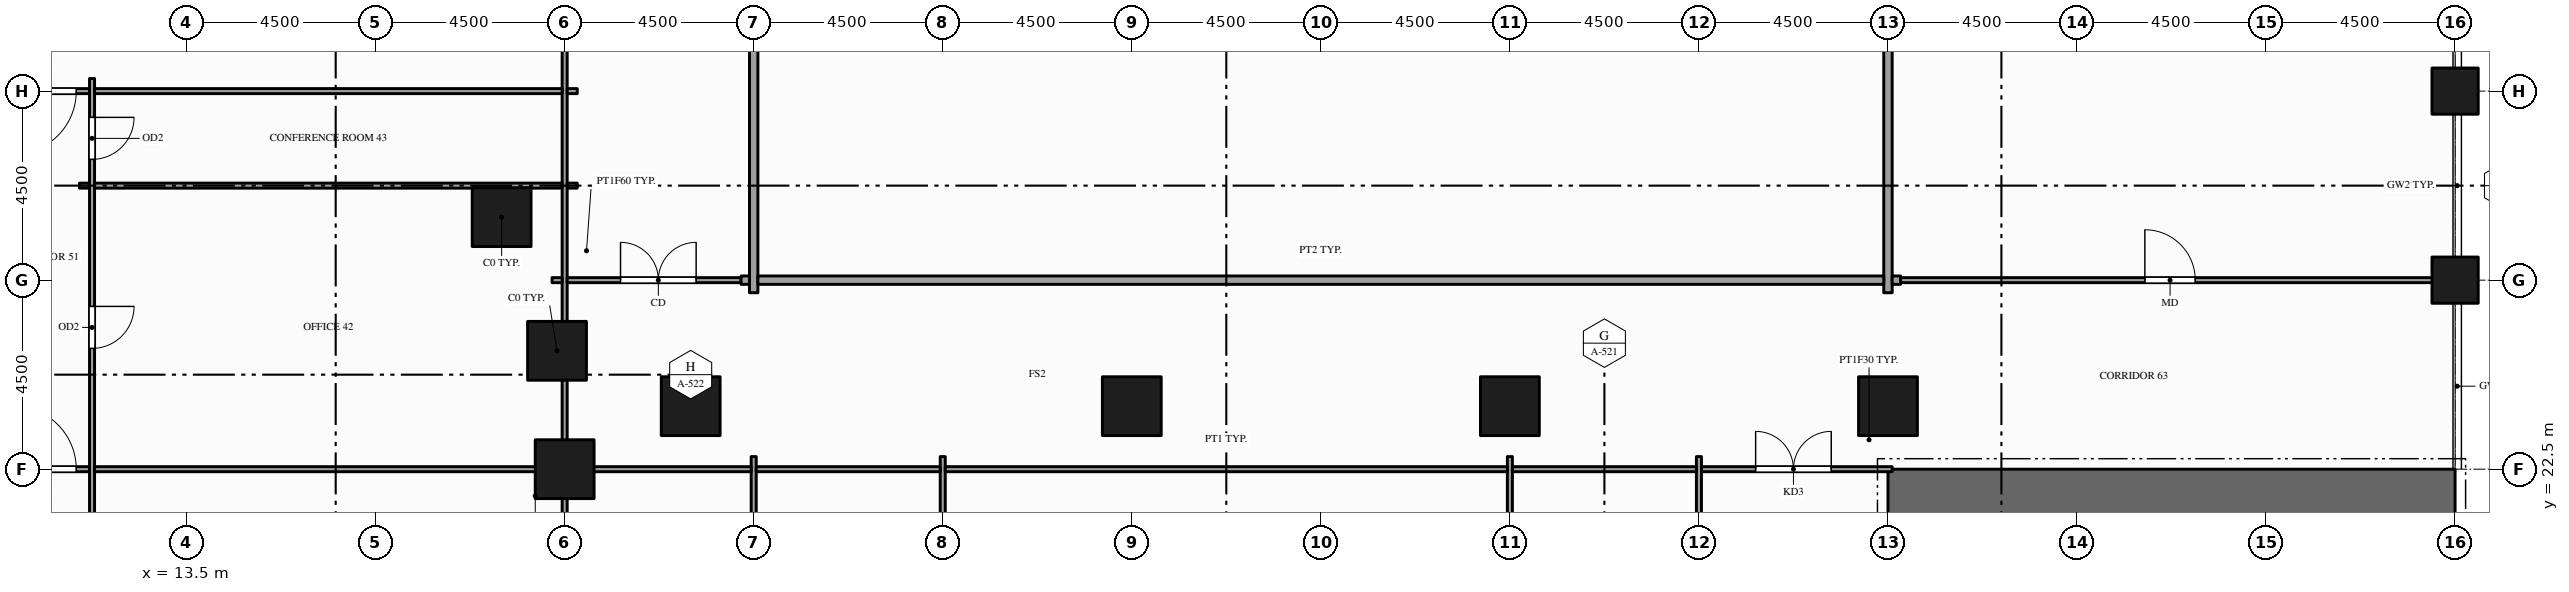
"""IFC4 building model, lengths in metres.
Left out: names, types, materials, properties, quantities, classifications, styles, units other than length and angle.
Written with IfcOpenShell. Run it as: python <this file> out.ifc"""

import sys

from ifc_helpers import new_model, si_unit, direction, frame, frame_2d, origin, origin_2d, place, context, subcontext, project, spatial, rectangle, hollow_rectangle, extrude, element, fill, save


model = new_model("IFC4")
c1 = context("Model", 3, precision=1e-05, world=origin(), true_north=direction((0.0, 1.0)))
c2 = subcontext(c1, "Body", "Model", "MODEL_VIEW")
j1 = project(units=[si_unit("LENGTHUNIT", "METRE"), si_unit("PLANEANGLEUNIT", "RADIAN")], contexts=[c1])
p1 = place(None, origin())
s1 = spatial("IfcSite", under=j1, at=p1, CompositionType="ELEMENT")
p2 = place(p1, origin())
s2 = spatial("IfcBuilding", under=s1, at=p2, CompositionType="ELEMENT")
p3 = place(p2, frame((0.0, 0.0, 14.0)))
s3 = spatial("IfcBuildingStorey", under=s2, at=p3, CompositionType="ELEMENT", Elevation=14.0)
p4 = place(p3, frame((54.0, 21.9, -0.15), z_axis=(0.0, 0.0, 1.0), x_axis=(1.0, 0.0, 0.0)))
e1 = element("IfcWall", 1, at=p4, inside=s3, PredefinedType="SHEAR", context=c2, shape_type="SweptSolid", body=[
    extrude(rectangle(XDim=13.5, YDim=1.2, at=frame_2d((6.75, 0.0))), origin(), (0.0, 0.0, 1.0), 5.0),
])
for number, where, z_axis, x_axis in (
    (2, (21.0, 28.5, -0.25), (0.0, 0.0, 1.0), (1.0, 0.0, 0.0)),
    (3, (22.318, 25.318, -0.25), (0.0, 0.0, 1.0), (1.0, 0.0, 0.0)),
    (4, (22.5, 22.5, -0.25), (0.0, 0.0, 1.0), (1.0, 0.0, 0.0)),
    (5, (25.5, 24.0, -0.25), (0.0, 0.0, 1.0), (1.0, 0.0, 0.0)),
    (6, (36.0, 24.0, -0.25), (0.0, 0.0, 1.0), (1.0, 0.0, 0.0)),
    (7, (45.0, 24.0, -0.25), (0.0, 0.0, 1.0), (1.0, 0.0, 0.0)),
    (8, (54.0, 24.0, -0.25), (0.0, 0.0, 1.0), (1.0, 0.0, 0.0)),
):
    element("IfcColumn", number, at=place(p3, frame(where, z_axis=z_axis, x_axis=x_axis)), inside=s3, PredefinedType="COLUMN", context=c2, shape_type="SweptSolid", body=[
        extrude(hollow_rectangle(XDim=1.4, YDim=1.4, WallThickness=0.08, at=origin_2d()), origin(), (0.0, 0.0, 1.0), 5.0),
    ])
for number, where, z_axis, x_axis in (
    (9, (67.5, 27.0, -0.25), (0.0, 0.0, 1.0), (1.0, 0.0, 0.0)),
    (10, (67.5, 31.5, -0.25), (0.0, 0.0, 1.0), (1.0, 0.0, 0.0)),
):
    element("IfcColumn", number, at=place(p3, frame(where, z_axis=z_axis, x_axis=x_axis)), inside=s3, PredefinedType="COLUMN", context=c2, shape_type="SweptSolid", body=[
        extrude(hollow_rectangle(XDim=1.1, YDim=1.1, WallThickness=0.06, at=origin_2d()), origin(), (0.0, 0.0, 1.0), 5.0),
    ])
p5 = place(p3, frame((11.25, 10.95, 0.0), z_axis=(0.0, 0.0, 1.0), x_axis=(0.0, 1.0, 0.0)))
e11 = element("IfcWall", 11, at=p5, inside=s3, PredefinedType="PARTITIONING", context=c2, shape_type="SweptSolid", body=[
    extrude(rectangle(XDim=20.85, YDim=0.12, at=frame_2d((10.425, 0.0))), origin(), (0.0, 0.0, 1.0), 3.5),
])
p6 = place(p5, frame((5.425, 0.0, 0.0)))
e12 = element("IfcOpeningElement", 12, at=p6, cuts=e11, PredefinedType="OPENING", context=c2, shape_type="SweptSolid", body=[
    extrude(rectangle(XDim=1.0, YDim=2.1, at=frame_2d((0.5, 1.05))), frame((0.0, 0.07, 0.0), z_axis=(0.0, -1.0, 0.0), x_axis=(1.0, 0.0, 0.0)), (0.0, 0.0, 1.0), 0.14),
])
p7 = place(p5, frame((14.425, 0.0, 0.0)))
e13 = element("IfcOpeningElement", 13, at=p7, cuts=e11, PredefinedType="OPENING", context=c2, shape_type="SweptSolid", body=[
    extrude(rectangle(XDim=1.0, YDim=2.1, at=frame_2d((0.5, 1.05))), frame((0.0, 0.07, 0.0), z_axis=(0.0, -1.0, 0.0), x_axis=(1.0, 0.0, 0.0)), (0.0, 0.0, 1.0), 0.14),
])
p8 = place(p5, frame((18.925, 0.0, 0.0)))
e14 = element("IfcOpeningElement", 14, at=p8, cuts=e11, PredefinedType="OPENING", context=c2, shape_type="SweptSolid", body=[
    extrude(rectangle(XDim=1.0, YDim=2.1, at=frame_2d((0.5, 1.05))), frame((0.0, 0.07, 0.0), z_axis=(0.0, -1.0, 0.0), x_axis=(1.0, 0.0, 0.0)), (0.0, 0.0, 1.0), 0.14),
])
p9 = place(p3, frame((22.5, 0.15, 0.0), z_axis=(0.0, 0.0, 1.0), x_axis=(0.0, 1.0, 0.0)))
e15 = element("IfcWall", 15, at=p9, inside=s3, PredefinedType="PARTITIONING", context=c2, shape_type="SweptSolid", body=[
    extrude(rectangle(XDim=35.95, YDim=0.12, at=frame_2d((17.975, 0.0))), origin(), (0.0, 0.0, 1.0), 3.759),
])
p10 = place(p9, frame((9.225, 0.0, 0.0)))
e16 = element("IfcOpeningElement", 16, at=p10, cuts=e15, PredefinedType="OPENING", context=c2, shape_type="SweptSolid", body=[
    extrude(rectangle(XDim=1.5, YDim=2.1, at=frame_2d((0.75, 1.05))), frame((0.0, 0.07, 0.0), z_axis=(0.0, -1.0, 0.0), x_axis=(1.0, 0.0, 0.0)), (0.0, 0.0, 1.0), 0.14),
])
p11 = place(p9, frame((32.7, 0.0, 0.0)))
e17 = element("IfcOpeningElement", 17, at=p11, cuts=e15, PredefinedType="OPENING", context=c2, shape_type="SweptSolid", body=[
    extrude(rectangle(XDim=1.8, YDim=2.1, at=frame_2d((0.9, 1.05))), frame((0.0, 0.07, 0.0), z_axis=(0.0, -1.0, 0.0), x_axis=(1.0, 0.0, 0.0)), (0.0, 0.0, 1.0), 0.14),
])
p12 = place(p3, frame((27.0, 10.95, 0.0), z_axis=(0.0, 0.0, 1.0), x_axis=(0.0, 1.0, 0.0)))
e18 = element("IfcWall", 18, at=p12, inside=s3, PredefinedType="PARTITIONING", context=c2, shape_type="SweptSolid", body=[
    extrude(rectangle(XDim=11.85, YDim=0.12, at=frame_2d((5.925, 0.0))), origin(), (0.0, 0.0, 1.0), 3.759),
])
p13 = place(p3, frame((27.0, 26.7, 0.0), z_axis=(0.0, 0.0, 1.0), x_axis=(0.0, 1.0, 0.0)))
e19 = element("IfcWall", 19, at=p13, inside=s3, PredefinedType="PARTITIONING", context=c2, shape_type="SweptSolid", body=[
    extrude(rectangle(XDim=22.65, YDim=0.2, at=frame_2d((11.325, 0.0))), origin(), (0.0, 0.0, 1.0), 3.66),
])
p14 = place(p13, frame((19.115, 0.0, 0.0)))
e20 = element("IfcOpeningElement", 20, at=p14, cuts=e19, PredefinedType="OPENING", context=c2, shape_type="SweptSolid", body=[
    extrude(rectangle(XDim=1.2, YDim=2.1, at=frame_2d((0.6, 1.05))), frame((0.0, 0.11, 0.0), z_axis=(0.0, -1.0, 0.0), x_axis=(1.0, 0.0, 0.0)), (0.0, 0.0, 1.0), 0.22),
])
p15 = place(p3, frame((31.5, 10.95, 0.0), z_axis=(0.0, 0.0, 1.0), x_axis=(0.0, 1.0, 0.0)))
e21 = element("IfcWall", 21, at=p15, inside=s3, PredefinedType="PARTITIONING", context=c2, shape_type="SweptSolid", body=[
    extrude(rectangle(XDim=11.85, YDim=0.12, at=frame_2d((5.925, 0.0))), origin(), (0.0, 0.0, 1.0), 3.759),
])
p16 = place(p3, frame((45.0, 0.15, 0.0), z_axis=(0.0, 0.0, 1.0), x_axis=(0.0, 1.0, 0.0)))
e22 = element("IfcWall", 22, at=p16, inside=s3, PredefinedType="PARTITIONING", context=c2, shape_type="SweptSolid", body=[
    extrude(rectangle(XDim=22.65, YDim=0.12, at=frame_2d((11.325, 0.0))), origin(), (0.0, 0.0, 1.0), 3.759),
])
p17 = place(p16, frame((9.225, 0.0, 0.0)))
e23 = element("IfcOpeningElement", 23, at=p17, cuts=e22, PredefinedType="OPENING", context=c2, shape_type="SweptSolid", body=[
    extrude(rectangle(XDim=1.5, YDim=2.1, at=frame_2d((0.75, 1.05))), frame((0.0, 0.07, 0.0), z_axis=(0.0, -1.0, 0.0), x_axis=(1.0, 0.0, 0.0)), (0.0, 0.0, 1.0), 0.14),
])
p18 = place(p3, frame((49.5, 0.15, 0.0), z_axis=(0.0, 0.0, 1.0), x_axis=(0.0, 1.0, 0.0)))
e24 = element("IfcWall", 24, at=p18, inside=s3, PredefinedType="PARTITIONING", context=c2, shape_type="SweptSolid", body=[
    extrude(rectangle(XDim=22.65, YDim=0.12, at=frame_2d((11.325, 0.0))), origin(), (0.0, 0.0, 1.0), 3.759),
])
p19 = place(p18, frame((0.955, 0.0, 0.0)))
e25 = element("IfcOpeningElement", 25, at=p19, cuts=e24, PredefinedType="OPENING", context=c2, shape_type="SweptSolid", body=[
    extrude(rectangle(XDim=0.9, YDim=2.1, at=frame_2d((0.45, 1.05))), frame((0.0, 0.07, 0.0), z_axis=(0.0, -1.0, 0.0), x_axis=(1.0, 0.0, 0.0)), (0.0, 0.0, 1.0), 0.14),
])
p20 = place(p18, frame((3.9, 0.0, 0.0)))
e26 = element("IfcOpeningElement", 26, at=p20, cuts=e24, PredefinedType="OPENING", context=c2, shape_type="SweptSolid", body=[
    extrude(rectangle(XDim=0.9, YDim=2.1, at=frame_2d((0.45, 1.05))), frame((0.0, 0.07, 0.0), z_axis=(0.0, -1.0, 0.0), x_axis=(1.0, 0.0, 0.0)), (0.0, 0.0, 1.0), 0.14),
])
p21 = place(p18, frame((6.85, 0.0, 0.0)))
e27 = element("IfcOpeningElement", 27, at=p21, cuts=e24, PredefinedType="OPENING", context=c2, shape_type="SweptSolid", body=[
    extrude(rectangle(XDim=1.0, YDim=2.1, at=frame_2d((0.5, 1.05))), frame((0.0, 0.07, 0.0), z_axis=(0.0, -1.0, 0.0), x_axis=(1.0, 0.0, 0.0)), (0.0, 0.0, 1.0), 0.14),
])
p22 = place(p18, frame((16.275, 0.0, 0.0)))
e28 = element("IfcOpeningElement", 28, at=p22, cuts=e24, PredefinedType="OPENING", context=c2, shape_type="SweptSolid", body=[
    extrude(rectangle(XDim=0.9, YDim=2.1, at=frame_2d((0.45, 1.05))), frame((0.0, 0.07, 0.0), z_axis=(0.0, -1.0, 0.0), x_axis=(1.0, 0.0, 0.0)), (0.0, 0.0, 1.0), 0.14),
])
p23 = place(p18, frame((9.225, 0.0, 0.0)))
e29 = element("IfcOpeningElement", 29, at=p23, cuts=e24, PredefinedType="OPENING", context=c2, shape_type="SweptSolid", body=[
    extrude(rectangle(XDim=1.5, YDim=2.1, at=frame_2d((0.75, 1.05))), frame((0.0, 0.07, 0.0), z_axis=(0.0, -1.0, 0.0), x_axis=(1.0, 0.0, 0.0)), (0.0, 0.0, 1.0), 0.14),
])
p24 = place(p3, frame((54.0, 26.7, 0.0), z_axis=(0.0, 0.0, 1.0), x_axis=(0.0, 1.0, 0.0)))
e30 = element("IfcWall", 30, at=p24, inside=s3, PredefinedType="PARTITIONING", context=c2, shape_type="SweptSolid", body=[
    extrude(rectangle(XDim=22.65, YDim=0.2, at=frame_2d((11.325, 0.0))), origin(), (0.0, 0.0, 1.0), 3.66),
])
p25 = place(p3, frame((9.06, 22.5, 0.0), z_axis=(0.0, 0.0, 1.0), x_axis=(1.0, 0.0, 0.0)))
e31 = element("IfcWall", 31, at=p25, inside=s3, PredefinedType="PARTITIONING", context=c2, shape_type="SweptSolid", body=[
    extrude(rectangle(XDim=2.13, YDim=0.12, at=frame_2d((1.065, 0.0))), origin(), (0.0, 0.0, 1.0), 3.5),
])
p26 = place(p25, frame((0.315, 0.0, 0.0)))
e32 = element("IfcOpeningElement", 32, at=p26, cuts=e31, PredefinedType="OPENING", context=c2, shape_type="SweptSolid", body=[
    extrude(rectangle(XDim=1.5, YDim=2.1, at=frame_2d((0.75, 1.05))), frame((0.0, 0.07, 0.0), z_axis=(0.0, -1.0, 0.0), x_axis=(1.0, 0.0, 0.0)), (0.0, 0.0, 1.0), 0.14),
])
p27 = place(p3, frame((11.31, 22.5, 0.0), z_axis=(0.0, 0.0, 1.0), x_axis=(1.0, 0.0, 0.0)))
e33 = element("IfcWall", 33, at=p27, inside=s3, PredefinedType="PARTITIONING", context=c2, shape_type="SweptSolid", body=[
    extrude(rectangle(XDim=11.13, YDim=0.12, at=frame_2d((5.565, 0.0))), origin(), (0.0, 0.0, 1.0), 3.5),
])
for number, where, z_axis, x_axis in (
    (34, (22.56, 22.5, 0.0), (0.0, 0.0, 1.0), (1.0, 0.0, 0.0)),
    (35, (27.06, 22.5, 0.0), (0.0, 0.0, 1.0), (1.0, 0.0, 0.0)),
):
    element("IfcWall", number, at=place(p3, frame(where, z_axis=z_axis, x_axis=x_axis)), inside=s3, PredefinedType="PARTITIONING", context=c2, shape_type="SweptSolid", body=[
        extrude(rectangle(XDim=4.38, YDim=0.12, at=frame_2d((2.19, 0.0))), origin(), (0.0, 0.0, 1.0), 3.66),
    ])
p28 = place(p3, frame((31.56, 22.5, 0.0), z_axis=(0.0, 0.0, 1.0), x_axis=(1.0, 0.0, 0.0)))
e36 = element("IfcWall", 36, at=p28, inside=s3, PredefinedType="PARTITIONING", context=c2, shape_type="SweptSolid", body=[
    extrude(rectangle(XDim=13.38, YDim=0.12, at=frame_2d((6.69, 0.0))), origin(), (0.0, 0.0, 1.0), 3.66),
])
p29 = place(p3, frame((45.06, 22.5, 0.0), z_axis=(0.0, 0.0, 1.0), x_axis=(1.0, 0.0, 0.0)))
e37 = element("IfcWall", 37, at=p29, inside=s3, PredefinedType="PARTITIONING", context=c2, shape_type="SweptSolid", body=[
    extrude(rectangle(XDim=4.38, YDim=0.12, at=frame_2d((2.19, 0.0))), origin(), (0.0, 0.0, 1.0), 3.66),
])
p30 = place(p3, frame((49.56, 22.5, 0.0), z_axis=(0.0, 0.0, 1.0), x_axis=(1.0, 0.0, 0.0)))
e38 = element("IfcWall", 38, at=p30, inside=s3, PredefinedType="PARTITIONING", context=c2, shape_type="SweptSolid", body=[
    extrude(rectangle(XDim=4.54, YDim=0.12, at=frame_2d((2.27, 0.0))), origin(), (0.0, 0.0, 1.0), 3.66),
])
p31 = place(p30, frame((1.29, 0.0, 0.0)))
e39 = element("IfcOpeningElement", 39, at=p31, cuts=e38, PredefinedType="OPENING", context=c2, shape_type="SweptSolid", body=[
    extrude(rectangle(XDim=1.8, YDim=2.1, at=frame_2d((0.9, 1.05))), frame((0.0, 0.07, 0.0), z_axis=(0.0, -1.0, 0.0), x_axis=(1.0, 0.0, 0.0)), (0.0, 0.0, 1.0), 0.14),
])
p32 = place(p3, frame((22.2, 27.0, 0.0), z_axis=(0.0, 0.0, 1.0), x_axis=(1.0, 0.0, 0.0)))
e40 = element("IfcWall", 40, at=p32, inside=s3, PredefinedType="PARTITIONING", context=c2, shape_type="SweptSolid", body=[
    extrude(rectangle(XDim=0.24, YDim=0.12, at=frame_2d((0.12, 0.0))), origin(), (0.0, 0.0, 1.0), 3.759),
])
p33 = place(p3, frame((22.56, 27.0, 0.0), z_axis=(0.0, 0.0, 1.0), x_axis=(1.0, 0.0, 0.0)))
e41 = element("IfcWall", 41, at=p33, inside=s3, PredefinedType="PARTITIONING", context=c2, shape_type="SweptSolid", body=[
    extrude(rectangle(XDim=4.14, YDim=0.12, at=frame_2d((2.07, 0.0))), origin(), (0.0, 0.0, 1.0), 3.66),
])
p34 = place(p33, frame((1.27, 0.0, 0.0)))
e42 = element("IfcOpeningElement", 42, at=p34, cuts=e41, PredefinedType="OPENING", context=c2, shape_type="SweptSolid", body=[
    extrude(rectangle(XDim=1.8, YDim=2.1, at=frame_2d((0.9, 1.05))), frame((0.0, 0.07, 0.0), z_axis=(0.0, -1.0, 0.0), x_axis=(1.0, 0.0, 0.0)), (0.0, 0.0, 1.0), 0.14),
])
p35 = place(p3, frame((26.7, 27.0, 0.0), z_axis=(0.0, 0.0, 1.0), x_axis=(1.0, 0.0, 0.0)))
e43 = element("IfcWall", 43, at=p35, inside=s3, PredefinedType="PARTITIONING", context=c2, shape_type="SweptSolid", body=[
    extrude(rectangle(XDim=0.2, YDim=0.2, at=frame_2d((0.1, 0.0))), origin(), (0.0, 0.0, 1.0), 3.66),
])
p36 = place(p3, frame((27.1, 27.0, 0.0), z_axis=(0.0, 0.0, 1.0), x_axis=(1.0, 0.0, 0.0)))
e44 = element("IfcWall", 44, at=p36, inside=s3, PredefinedType="PARTITIONING", context=c2, shape_type="SweptSolid", body=[
    extrude(rectangle(XDim=26.8, YDim=0.2, at=frame_2d((13.4, 0.0))), origin(), (0.0, 0.0, 1.0), 3.66),
])
p37 = place(p3, frame((54.1, 27.0, 0.0), z_axis=(0.0, 0.0, 1.0), x_axis=(1.0, 0.0, 0.0)))
e45 = element("IfcWall", 45, at=p37, inside=s3, PredefinedType="PARTITIONING", context=c2, shape_type="SweptSolid", body=[
    extrude(rectangle(XDim=0.2, YDim=0.2, at=frame_2d((0.1, 0.0))), origin(), (0.0, 0.0, 1.0), 3.66),
])
p38 = place(p3, frame((54.3, 27.0, 0.0), z_axis=(0.0, 0.0, 1.0), x_axis=(1.0, 0.0, 0.0)))
e46 = element("IfcWall", 46, at=p38, inside=s3, PredefinedType="PARTITIONING", context=c2, shape_type="SweptSolid", body=[
    extrude(rectangle(XDim=13.05, YDim=0.12, at=frame_2d((6.525, 0.0))), origin(), (0.0, 0.0, 1.0), 3.66),
])
p39 = place(p38, frame((5.815, 0.0, 0.0)))
e47 = element("IfcOpeningElement", 47, at=p39, cuts=e46, PredefinedType="OPENING", context=c2, shape_type="SweptSolid", body=[
    extrude(rectangle(XDim=1.2, YDim=2.1, at=frame_2d((0.6, 1.05))), frame((0.0, 0.07, 0.0), z_axis=(0.0, -1.0, 0.0), x_axis=(1.0, 0.0, 0.0)), (0.0, 0.0, 1.0), 0.14),
])
p40 = place(p3, frame((10.95, 29.25, 0.0), z_axis=(0.0, 0.0, 1.0), x_axis=(1.0, 0.0, 0.0)))
e48 = element("IfcWall", 48, at=p40, inside=s3, PredefinedType="PARTITIONING", context=c2, shape_type="SweptSolid", body=[
    extrude(rectangle(XDim=0.24, YDim=0.12, at=frame_2d((0.12, 0.0))), origin(), (0.0, 0.0, 1.0), 3.759),
])
p41 = place(p3, frame((11.31, 29.25, 0.0), z_axis=(0.0, 0.0, 1.0), x_axis=(1.0, 0.0, 0.0)))
e49 = element("IfcWall", 49, at=p41, inside=s3, PredefinedType="PARTITIONING", context=c2, shape_type="SweptSolid", body=[
    extrude(rectangle(XDim=11.13, YDim=0.12, at=frame_2d((5.565, 0.0))), origin(), (0.0, 0.0, 1.0), 3.5),
])
p42 = place(p3, frame((22.56, 29.25, 0.0), z_axis=(0.0, 0.0, 1.0), x_axis=(1.0, 0.0, 0.0)))
e50 = element("IfcWall", 50, at=p42, inside=s3, PredefinedType="PARTITIONING", context=c2, shape_type="SweptSolid", body=[
    extrude(rectangle(XDim=0.24, YDim=0.12, at=frame_2d((0.12, 0.0))), origin(), (0.0, 0.0, 1.0), 3.759),
])
p43 = place(p3, frame((9.06, 31.5, 0.0), z_axis=(0.0, 0.0, 1.0), x_axis=(1.0, 0.0, 0.0)))
e51 = element("IfcWall", 51, at=p43, inside=s3, PredefinedType="PARTITIONING", context=c2, shape_type="SweptSolid", body=[
    extrude(rectangle(XDim=2.13, YDim=0.12, at=frame_2d((1.065, 0.0))), origin(), (0.0, 0.0, 1.0), 3.759),
])
p44 = place(p43, frame((0.315, 0.0, 0.0)))
e52 = element("IfcOpeningElement", 52, at=p44, cuts=e51, PredefinedType="OPENING", context=c2, shape_type="SweptSolid", body=[
    extrude(rectangle(XDim=1.5, YDim=2.1, at=frame_2d((0.75, 1.05))), frame((0.0, 0.07, 0.0), z_axis=(0.0, -1.0, 0.0), x_axis=(1.0, 0.0, 0.0)), (0.0, 0.0, 1.0), 0.14),
])
p45 = place(p3, frame((11.31, 31.5, 0.0), z_axis=(0.0, 0.0, 1.0), x_axis=(1.0, 0.0, 0.0)))
e53 = element("IfcWall", 53, at=p45, inside=s3, PredefinedType="PARTITIONING", context=c2, shape_type="SweptSolid", body=[
    extrude(rectangle(XDim=11.13, YDim=0.12, at=frame_2d((5.565, 0.0))), origin(), (0.0, 0.0, 1.0), 3.5),
])
p46 = place(p3, frame((22.56, 31.5, 0.0), z_axis=(0.0, 0.0, 1.0), x_axis=(1.0, 0.0, 0.0)))
e54 = element("IfcWall", 54, at=p46, inside=s3, PredefinedType="PARTITIONING", context=c2, shape_type="SweptSolid", body=[
    extrude(rectangle(XDim=0.24, YDim=0.12, at=frame_2d((0.12, 0.0))), origin(), (0.0, 0.0, 1.0), 3.759),
])
p47 = place(p26, origin())
e55 = element("IfcDoor", 55, at=p47, inside=s3, OperationType="SINGLE_SWING_LEFT", PredefinedType="DOOR", context=c2, shape_type="SweptSolid", body=[
    extrude(rectangle(XDim=1.5, YDim=2.1, at=frame_2d((0.75, 1.05))), frame((0.0, 0.025, 0.0), z_axis=(0.0, -1.0, 0.0), x_axis=(1.0, 0.0, 0.0)), (0.0, 0.0, 1.0), 0.05),
])
fill(e32, e55)
p48 = place(p44, origin())
e56 = element("IfcDoor", 56, at=p48, inside=s3, OperationType="SINGLE_SWING_LEFT", PredefinedType="DOOR", context=c2, shape_type="SweptSolid", body=[
    extrude(rectangle(XDim=1.5, YDim=2.1, at=frame_2d((0.75, 1.05))), frame((0.0, 0.025, 0.0), z_axis=(0.0, -1.0, 0.0), x_axis=(1.0, 0.0, 0.0)), (0.0, 0.0, 1.0), 0.05),
])
fill(e52, e56)
p49 = place(p7, origin())
e57 = element("IfcDoor", 57, at=p49, inside=s3, OperationType="SINGLE_SWING_RIGHT", PredefinedType="DOOR", context=c2, shape_type="SweptSolid", body=[
    extrude(rectangle(XDim=1.0, YDim=2.1, at=frame_2d((0.5, 1.05))), frame((0.0, 0.025, 0.0), z_axis=(0.0, -1.0, 0.0), x_axis=(1.0, 0.0, 0.0)), (0.0, 0.0, 1.0), 0.05),
])
fill(e13, e57)
p50 = place(p8, origin())
e58 = element("IfcDoor", 58, at=p50, inside=s3, OperationType="SINGLE_SWING_RIGHT", PredefinedType="DOOR", context=c2, shape_type="SweptSolid", body=[
    extrude(rectangle(XDim=1.0, YDim=2.1, at=frame_2d((0.5, 1.05))), frame((0.0, 0.025, 0.0), z_axis=(0.0, -1.0, 0.0), x_axis=(1.0, 0.0, 0.0)), (0.0, 0.0, 1.0), 0.05),
])
fill(e14, e58)
p51 = place(p31, origin())
e59 = element("IfcDoor", 59, at=p51, inside=s3, OperationType="DOUBLE_DOOR_SINGLE_SWING", PredefinedType="DOOR", context=c2, shape_type="SweptSolid", body=[
    extrude(rectangle(XDim=1.8, YDim=2.1, at=frame_2d((0.9, 1.05))), frame((0.0, 0.025, 0.0), z_axis=(0.0, -1.0, 0.0), x_axis=(1.0, 0.0, 0.0)), (0.0, 0.0, 1.0), 0.05),
])
fill(e39, e59)
p52 = place(p34, origin())
e60 = element("IfcDoor", 60, at=p52, inside=s3, OperationType="DOUBLE_DOOR_SINGLE_SWING", PredefinedType="DOOR", context=c2, shape_type="SweptSolid", body=[
    extrude(rectangle(XDim=1.8, YDim=2.1, at=frame_2d((0.9, 1.05))), frame((0.0, 0.025, 0.0), z_axis=(0.0, -1.0, 0.0), x_axis=(1.0, 0.0, 0.0)), (0.0, 0.0, 1.0), 0.05),
])
fill(e42, e60)
p53 = place(p39, origin())
e61 = element("IfcDoor", 61, at=p53, inside=s3, OperationType="SINGLE_SWING_LEFT", PredefinedType="DOOR", context=c2, shape_type="SweptSolid", body=[
    extrude(rectangle(XDim=1.2, YDim=2.1, at=frame_2d((0.6, 1.05))), frame((0.0, 0.025, 0.0), z_axis=(0.0, -1.0, 0.0), x_axis=(1.0, 0.0, 0.0)), (0.0, 0.0, 1.0), 0.05),
])
fill(e47, e61)
save(model, sys.argv[1])
